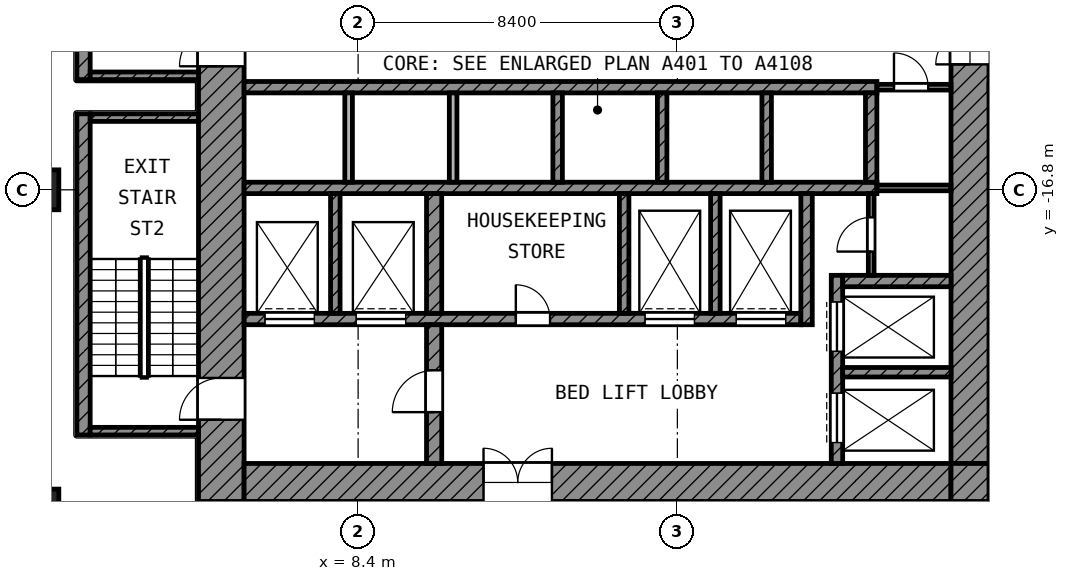
"""IFC4 building model, lengths in metres.
Left out: names, types, materials, properties, quantities, classifications, styles, units other than length and angle.
Written with IfcOpenShell. Run it as: python <this file> out.ifc"""

import sys

from ifc_helpers import new_model, si_unit, direction, frame, frame_2d, origin, origin_2d, place, context, subcontext, project, spatial, rectangle, extrude, element, fill, save


model = new_model("IFC4")
c1 = context("Model", 3, precision=1e-05, world=origin(), true_north=direction((0.0, 1.0)))
c2 = subcontext(c1, "Body", "Model", "MODEL_VIEW")
j1 = project(units=[si_unit("LENGTHUNIT", "METRE"), si_unit("PLANEANGLEUNIT", "RADIAN")], contexts=[c1])
p1 = place(None, origin())
s1 = spatial("IfcSite", under=j1, at=p1, CompositionType="ELEMENT")
p2 = place(p1, origin())
s2 = spatial("IfcBuilding", under=s1, at=p2, CompositionType="ELEMENT")
p3 = place(p2, frame((0.0, 0.0, 98.8)))
s3 = spatial("IfcBuildingStorey", under=s2, at=p3, CompositionType="ELEMENT", Elevation=98.8)
for number, where, z_axis, x_axis in (
    (1, (0.0, -16.8, 0.0), (0.0, 0.0, 1.0), (1.0, 0.0, 0.0)),
    (2, (0.0, -25.2, 0.0), (0.0, 0.0, 1.0), (1.0, 0.0, 0.0)),
):
    element("IfcColumn", number, at=place(p3, frame(where, z_axis=z_axis, x_axis=x_axis)), inside=s3, PredefinedType="COLUMN", context=c2, shape_type="SweptSolid", body=[
        extrude(rectangle(XDim=1.05, YDim=1.05, at=origin_2d()), origin(), (0.0, 0.0, 1.0), 4.2),
    ])
p4 = place(p3, frame((4.8, -25.0, 0.0), z_axis=(0.0, 0.0, 1.0), x_axis=(0.0, 1.0, 0.0)))
e3 = element("IfcWall", 3, at=p4, inside=s3, PredefinedType="SHEAR", context=c2, shape_type="SweptSolid", body=[
    extrude(rectangle(XDim=19.6, YDim=1.2, at=frame_2d((9.8, 0.0))), origin(), (0.0, 0.0, 1.0), 3.6),
])
p5 = place(p4, frame((11.45, 0.0, 0.0)))
e4 = element("IfcOpeningElement", 4, at=p5, cuts=e3, PredefinedType="OPENING", context=c2, shape_type="SweptSolid", body=[
    extrude(rectangle(XDim=1.1, YDim=2.1, at=frame_2d((0.55, 1.05))), frame((0.0, 0.61, 0.0), z_axis=(0.0, -1.0, 0.0), x_axis=(1.0, 0.0, 0.0)), (0.0, 0.0, 1.0), 1.22),
])
p6 = place(p4, frame((2.15, 0.0, 0.0)))
e5 = element("IfcOpeningElement", 5, at=p6, cuts=e3, PredefinedType="OPENING", context=c2, shape_type="SweptSolid", body=[
    extrude(rectangle(XDim=1.1, YDim=2.1, at=frame_2d((0.55, 1.05))), frame((0.0, 0.61, 0.0), z_axis=(0.0, -1.0, 0.0), x_axis=(1.0, 0.0, 0.0)), (0.0, 0.0, 1.0), 1.22),
])
p7 = place(p3, frame((24.5, -24.0, 0.0), z_axis=(0.0, 0.0, 1.0), x_axis=(0.0, 1.0, 0.0)))
e6 = element("IfcWall", 6, at=p7, inside=s3, PredefinedType="SHEAR", context=c2, shape_type="SweptSolid", body=[
    extrude(rectangle(XDim=18.6, YDim=1.0, at=frame_2d((9.3, 0.0))), origin(), (0.0, 0.0, 1.0), 3.6),
])
p8 = place(p7, frame((10.5, 0.0, 0.0)))
e7 = element("IfcOpeningElement", 7, at=p8, cuts=e6, PredefinedType="OPENING", context=c2, shape_type="SweptSolid", body=[
    extrude(rectangle(XDim=1.8, YDim=2.1, at=frame_2d((0.9, 1.05))), frame((0.0, 0.51, 0.0), z_axis=(0.0, -1.0, 0.0), x_axis=(1.0, 0.0, 0.0)), (0.0, 0.0, 1.0), 1.02),
])
p9 = place(p3, frame((5.4, -24.5, 0.0), z_axis=(0.0, 0.0, 1.0), x_axis=(1.0, 0.0, 0.0)))
e8 = element("IfcWall", 8, at=p9, inside=s3, PredefinedType="SHEAR", context=c2, shape_type="SweptSolid", body=[
    extrude(rectangle(XDim=18.6, YDim=1.0, at=frame_2d((9.3, 0.0))), origin(), (0.0, 0.0, 1.0), 3.6),
])
p10 = place(p9, frame((6.3, 0.0, 0.0)))
e9 = element("IfcOpeningElement", 9, at=p10, cuts=e8, PredefinedType="OPENING", context=c2, shape_type="SweptSolid", body=[
    extrude(rectangle(XDim=1.8, YDim=2.1, at=frame_2d((0.9, 1.05))), frame((0.0, 0.51, 0.0), z_axis=(0.0, -1.0, 0.0), x_axis=(1.0, 0.0, 0.0)), (0.0, 0.0, 1.0), 1.02),
])
p11 = place(p3, frame((24.5, -25.0, 0.0), z_axis=(0.0, 0.0, 1.0), x_axis=(0.0, 1.0, 0.0)))
e10 = element("IfcWall", 10, at=p11, inside=s3, PredefinedType="SHEAR", context=c2, shape_type="SweptSolid", body=[
    extrude(rectangle(XDim=1.0, YDim=1.0, at=frame_2d((0.5, 0.0))), origin(), (0.0, 0.0, 1.0), 3.6),
])
for number, where, z_axis, x_axis in (
    (11, (5.4, -14.1, 0.0), (0.0, 0.0, 1.0), (1.0, 0.0, 0.0)),
    (12, (5.4, -16.75, 0.0), (0.0, 0.0, 1.0), (1.0, 0.0, 0.0)),
):
    element("IfcWall", number, at=place(p3, frame(where, z_axis=z_axis, x_axis=x_axis)), inside=s3, PredefinedType="SHEAR", context=c2, shape_type="SweptSolid", body=[
        extrude(rectangle(XDim=16.65, YDim=0.3, at=frame_2d((8.325, 0.0))), origin(), (0.0, 0.0, 1.0), 3.6),
    ])
p12 = place(p3, frame((5.4, -20.2, 0.0), z_axis=(0.0, 0.0, 1.0), x_axis=(1.0, 0.0, 0.0)))
e13 = element("IfcWall", 13, at=p12, inside=s3, PredefinedType="SHEAR", context=c2, shape_type="SweptSolid", body=[
    extrude(rectangle(XDim=14.65, YDim=0.3, at=frame_2d((7.325, 0.0))), origin(), (0.0, 0.0, 1.0), 3.6),
])
p13 = place(p12, frame((10.55, 0.0, 0.0)))
e14 = element("IfcOpeningElement", 14, at=p13, cuts=e13, PredefinedType="OPENING", context=c2, shape_type="SweptSolid", body=[
    extrude(rectangle(XDim=1.3, YDim=2.1, at=frame_2d((0.65, 1.05))), frame((0.0, 0.16, 0.0), z_axis=(0.0, -1.0, 0.0), x_axis=(1.0, 0.0, 0.0)), (0.0, 0.0, 1.0), 0.32),
])
p14 = place(p12, frame((12.95, 0.0, 0.0)))
e15 = element("IfcOpeningElement", 15, at=p14, cuts=e13, PredefinedType="OPENING", context=c2, shape_type="SweptSolid", body=[
    extrude(rectangle(XDim=1.3, YDim=2.1, at=frame_2d((0.65, 1.05))), frame((0.0, 0.16, 0.0), z_axis=(0.0, -1.0, 0.0), x_axis=(1.0, 0.0, 0.0)), (0.0, 0.0, 1.0), 0.32),
])
p15 = place(p12, frame((0.55, 0.0, 0.0)))
e16 = element("IfcOpeningElement", 16, at=p15, cuts=e13, PredefinedType="OPENING", context=c2, shape_type="SweptSolid", body=[
    extrude(rectangle(XDim=1.3, YDim=2.1, at=frame_2d((0.65, 1.05))), frame((0.0, 0.16, 0.0), z_axis=(0.0, -1.0, 0.0), x_axis=(1.0, 0.0, 0.0)), (0.0, 0.0, 1.0), 0.32),
])
p16 = place(p12, frame((2.95, 0.0, 0.0)))
e17 = element("IfcOpeningElement", 17, at=p16, cuts=e13, PredefinedType="OPENING", context=c2, shape_type="SweptSolid", body=[
    extrude(rectangle(XDim=1.3, YDim=2.1, at=frame_2d((0.65, 1.05))), frame((0.0, 0.16, 0.0), z_axis=(0.0, -1.0, 0.0), x_axis=(1.0, 0.0, 0.0)), (0.0, 0.0, 1.0), 0.32),
])
p17 = place(p12, frame((7.15, 0.0, 0.0)))
e18 = element("IfcOpeningElement", 18, at=p17, cuts=e13, PredefinedType="OPENING", context=c2, shape_type="SweptSolid", body=[
    extrude(rectangle(XDim=0.9, YDim=2.1, at=frame_2d((0.45, 1.05))), frame((0.0, 0.16, 0.0), z_axis=(0.0, -1.0, 0.0), x_axis=(1.0, 0.0, 0.0)), (0.0, 0.0, 1.0), 0.32),
])
p18 = place(p3, frame((10.4, -24.0, 0.0), z_axis=(0.0, 0.0, 1.0), x_axis=(0.0, 1.0, 0.0)))
e19 = element("IfcWall", 19, at=p18, inside=s3, PredefinedType="SHEAR", context=c2, shape_type="SweptSolid", body=[
    extrude(rectangle(XDim=3.65, YDim=0.4, at=frame_2d((1.825, 0.0))), origin(), (0.0, 0.0, 1.0), 3.6),
])
p19 = place(p18, frame((1.35, 0.0, 0.0)))
e20 = element("IfcOpeningElement", 20, at=p19, cuts=e19, PredefinedType="OPENING", context=c2, shape_type="SweptSolid", body=[
    extrude(rectangle(XDim=1.1, YDim=2.1, at=frame_2d((0.55, 1.05))), frame((0.0, 0.21, 0.0), z_axis=(0.0, -1.0, 0.0), x_axis=(1.0, 0.0, 0.0)), (0.0, 0.0, 1.0), 0.42),
])
p20 = place(p3, frame((10.4, -20.05, 0.0), z_axis=(0.0, 0.0, 1.0), x_axis=(0.0, 1.0, 0.0)))
e21 = element("IfcWall", 21, at=p20, inside=s3, PredefinedType="SHEAR", context=c2, shape_type="SweptSolid", body=[
    extrude(rectangle(XDim=3.15, YDim=0.4, at=frame_2d((1.575, 0.0))), origin(), (0.0, 0.0, 1.0), 3.6),
])
p21 = place(p3, frame((20.2, -20.35, 0.0), z_axis=(0.0, 0.0, 1.0), x_axis=(0.0, 1.0, 0.0)))
e22 = element("IfcWall", 22, at=p21, inside=s3, PredefinedType="SHEAR", context=c2, shape_type="SweptSolid", body=[
    extrude(rectangle(XDim=3.45, YDim=0.3, at=frame_2d((1.725, 0.0))), origin(), (0.0, 0.0, 1.0), 3.6),
])
p22 = place(p3, frame((21.9, -16.6, 0.0), z_axis=(0.0, 0.0, 1.0), x_axis=(0.0, 1.0, 0.0)))
e23 = element("IfcWall", 23, at=p22, inside=s3, PredefinedType="SHEAR", context=c2, shape_type="SweptSolid", body=[
    extrude(rectangle(XDim=2.35, YDim=0.3, at=frame_2d((1.175, 0.0))), origin(), (0.0, 0.0, 1.0), 3.6),
])
p23 = place(p3, frame((21.15, -19.2, 0.0), z_axis=(0.0, 0.0, 1.0), x_axis=(1.0, 0.0, 0.0)))
e24 = element("IfcWall", 24, at=p23, inside=s3, PredefinedType="SHEAR", context=c2, shape_type="SweptSolid", body=[
    extrude(rectangle(XDim=2.85, YDim=0.3, at=frame_2d((1.425, 0.0))), origin(), (0.0, 0.0, 1.0), 3.6),
])
p24 = place(p3, frame((21.0, -24.0, 0.0), z_axis=(0.0, 0.0, 1.0), x_axis=(0.0, 1.0, 0.0)))
e25 = element("IfcWall", 25, at=p24, inside=s3, PredefinedType="SHEAR", context=c2, shape_type="SweptSolid", body=[
    extrude(rectangle(XDim=4.95, YDim=0.3, at=frame_2d((2.475, 0.0))), origin(), (0.0, 0.0, 1.0), 3.6),
])
p25 = place(p24, frame((2.95, 0.0, 0.0)))
e26 = element("IfcOpeningElement", 26, at=p25, cuts=e25, PredefinedType="OPENING", context=c2, shape_type="SweptSolid", body=[
    extrude(rectangle(XDim=1.3, YDim=2.1, at=frame_2d((0.65, 1.05))), frame((0.0, 0.16, 0.0), z_axis=(0.0, -1.0, 0.0), x_axis=(1.0, 0.0, 0.0)), (0.0, 0.0, 1.0), 0.32),
])
p26 = place(p24, frame((0.55, 0.0, 0.0)))
e27 = element("IfcOpeningElement", 27, at=p26, cuts=e25, PredefinedType="OPENING", context=c2, shape_type="SweptSolid", body=[
    extrude(rectangle(XDim=1.3, YDim=2.1, at=frame_2d((0.65, 1.05))), frame((0.0, 0.16, 0.0), z_axis=(0.0, -1.0, 0.0), x_axis=(1.0, 0.0, 0.0)), (0.0, 0.0, 1.0), 0.32),
])
p27 = place(p3, frame((21.15, -21.6, 0.0), z_axis=(0.0, 0.0, 1.0), x_axis=(1.0, 0.0, 0.0)))
e28 = element("IfcWall", 28, at=p27, inside=s3, PredefinedType="SHEAR", context=c2, shape_type="SweptSolid", body=[
    extrude(rectangle(XDim=2.85, YDim=0.25, at=frame_2d((1.425, 0.0))), origin(), (0.0, 0.0, 1.0), 3.6),
])
for number, where, z_axis, x_axis in (
    (29, (7.8, -20.05, 0.0), (0.0, 0.0, 1.0), (0.0, 1.0, 0.0)),
    (30, (15.4, -20.05, 0.0), (0.0, 0.0, 1.0), (0.0, 1.0, 0.0)),
    (31, (17.8, -20.05, 0.0), (0.0, 0.0, 1.0), (0.0, 1.0, 0.0)),
):
    element("IfcWall", number, at=place(p3, frame(where, z_axis=z_axis, x_axis=x_axis)), inside=s3, PredefinedType="SHEAR", context=c2, shape_type="SweptSolid", body=[
        extrude(rectangle(XDim=3.15, YDim=0.25, at=frame_2d((1.575, 0.0))), origin(), (0.0, 0.0, 1.0), 3.6),
    ])
for number, where, z_axis, x_axis in (
    (32, (8.15, -16.6, 0.0), (0.0, 0.0, 1.0), (0.0, 1.0, 0.0)),
    (33, (10.9, -16.6, 0.0), (0.0, 0.0, 1.0), (0.0, 1.0, 0.0)),
):
    element("IfcWall", number, at=place(p3, frame(where, z_axis=z_axis, x_axis=x_axis)), inside=s3, PredefinedType="PARTITIONING", context=c2, shape_type="SweptSolid", body=[
        extrude(rectangle(XDim=2.35, YDim=0.2, at=frame_2d((1.175, 0.0))), origin(), (0.0, 0.0, 1.0), 3.6),
    ])
for number, where, z_axis, x_axis in (
    (34, (13.65, -16.6, 0.0), (0.0, 0.0, 1.0), (0.0, 1.0, 0.0)),
    (35, (16.4, -16.6, 0.0), (0.0, 0.0, 1.0), (0.0, 1.0, 0.0)),
    (36, (19.15, -16.6, 0.0), (0.0, 0.0, 1.0), (0.0, 1.0, 0.0)),
):
    element("IfcWall", number, at=place(p3, frame(where, z_axis=z_axis, x_axis=x_axis)), inside=s3, PredefinedType="SHEAR", context=c2, shape_type="SweptSolid", body=[
        extrude(rectangle(XDim=2.35, YDim=0.25, at=frame_2d((1.175, 0.0))), origin(), (0.0, 0.0, 1.0), 3.6),
    ])
p28 = place(p3, frame((21.9, -19.05, 0.0), z_axis=(0.0, 0.0, 1.0), x_axis=(0.0, 1.0, 0.0)))
e37 = element("IfcWall", 37, at=p28, inside=s3, PredefinedType="PARTITIONING", context=c2, shape_type="SweptSolid", body=[
    extrude(rectangle(XDim=2.15, YDim=0.15, at=frame_2d((1.075, 0.0))), origin(), (0.0, 0.0, 1.0), 3.6),
])
p29 = place(p28, frame((0.625, 0.0, 0.0)))
e38 = element("IfcOpeningElement", 38, at=p29, cuts=e37, PredefinedType="OPENING", context=c2, shape_type="SweptSolid", body=[
    extrude(rectangle(XDim=0.9, YDim=2.1, at=frame_2d((0.45, 1.05))), frame((0.0, 0.085, 0.0), z_axis=(0.0, -1.0, 0.0), x_axis=(1.0, 0.0, 0.0)), (0.0, 0.0, 1.0), 0.17),
])
p30 = place(p3, frame((22.05, -16.75, 0.0), z_axis=(0.0, 0.0, 1.0), x_axis=(1.0, 0.0, 0.0)))
e39 = element("IfcWall", 39, at=p30, inside=s3, PredefinedType="PARTITIONING", context=c2, shape_type="SweptSolid", body=[
    extrude(rectangle(XDim=1.95, YDim=0.15, at=frame_2d((0.975, 0.0))), origin(), (0.0, 0.0, 1.0), 3.6),
])
p31 = place(p3, frame((22.05, -14.1, 0.0), z_axis=(0.0, 0.0, 1.0), x_axis=(1.0, 0.0, 0.0)))
e40 = element("IfcWall", 40, at=p31, inside=s3, PredefinedType="PARTITIONING", context=c2, shape_type="SweptSolid", body=[
    extrude(rectangle(XDim=1.95, YDim=0.15, at=frame_2d((0.975, 0.0))), origin(), (0.0, 0.0, 1.0), 3.6),
])
p32 = place(p31, frame((0.45, 0.0, 0.0)))
e41 = element("IfcOpeningElement", 41, at=p32, cuts=e40, PredefinedType="OPENING", context=c2, shape_type="SweptSolid", body=[
    extrude(rectangle(XDim=0.9, YDim=2.1, at=frame_2d((0.45, 1.05))), frame((0.0, 0.085, 0.0), z_axis=(0.0, -1.0, 0.0), x_axis=(1.0, 0.0, 0.0)), (0.0, 0.0, 1.0), 0.17),
])
p33 = place(p3, frame((1.175, -13.9, 0.0), z_axis=(0.0, 0.0, 1.0), x_axis=(0.0, 1.0, 0.0)))
e42 = element("IfcWall", 42, at=p33, inside=s3, PredefinedType="SHEAR", context=c2, shape_type="SweptSolid", body=[
    extrude(rectangle(XDim=8.45, YDim=0.35, at=frame_2d((4.225, 0.0))), origin(), (0.0, 0.0, 1.0), 3.6),
])
p34 = place(p3, frame((1.35, -13.8, 0.0), z_axis=(0.0, 0.0, 1.0), x_axis=(1.0, 0.0, 0.0)))
e43 = element("IfcWall", 43, at=p34, inside=s3, PredefinedType="SHEAR", context=c2, shape_type="SweptSolid", body=[
    extrude(rectangle(XDim=2.85, YDim=0.2, at=frame_2d((1.425, 0.0))), origin(), (0.0, 0.0, 1.0), 3.6),
])
p35 = place(p3, frame((1.175, -23.25, 0.0), z_axis=(0.0, 0.0, 1.0), x_axis=(0.0, 1.0, 0.0)))
e44 = element("IfcWall", 44, at=p35, inside=s3, PredefinedType="SHEAR", context=c2, shape_type="SweptSolid", body=[
    extrude(rectangle(XDim=8.45, YDim=0.35, at=frame_2d((4.225, 0.0))), origin(), (0.0, 0.0, 1.0), 3.6),
])
for number, where, z_axis, x_axis in (
    (45, (1.35, -14.9, 0.0), (0.0, 0.0, 1.0), (1.0, 0.0, 0.0)),
    (46, (1.35, -23.15, 0.0), (0.0, 0.0, 1.0), (1.0, 0.0, 0.0)),
):
    element("IfcWall", number, at=place(p3, frame(where, z_axis=z_axis, x_axis=x_axis)), inside=s3, PredefinedType="SHEAR", context=c2, shape_type="SweptSolid", body=[
        extrude(rectangle(XDim=2.85, YDim=0.2, at=frame_2d((1.425, 0.0))), origin(), (0.0, 0.0, 1.0), 3.6),
    ])
p36 = place(p3, frame((8.4, -31.782, 0.0), z_axis=(0.0, 0.0, 1.0), x_axis=(0.0, 1.0, 0.0)))
e47 = element("IfcWall", 47, at=p36, inside=s3, PredefinedType="PARTITIONING", context=c2, shape_type="SweptSolid", body=[
    extrude(rectangle(XDim=6.782, YDim=0.15, at=frame_2d((3.391, 0.0))), origin(), (0.0, 0.0, 1.0), 3.6),
])
p37 = place(p36, frame((3.732, 0.0, 0.0)))
e48 = element("IfcOpeningElement", 48, at=p37, cuts=e47, PredefinedType="OPENING", context=c2, shape_type="SweptSolid", body=[
    extrude(rectangle(XDim=1.2, YDim=2.1, at=frame_2d((0.6, 1.05))), frame((0.0, 0.085, 0.0), z_axis=(0.0, -1.0, 0.0), x_axis=(1.0, 0.0, 0.0)), (0.0, 0.0, 1.0), 0.17),
])
p38 = place(p3, frame((14.1, -29.325, 0.0), z_axis=(0.0, 0.0, 1.0), x_axis=(0.0, 1.0, 0.0)))
e49 = element("IfcWall", 49, at=p38, inside=s3, PredefinedType="PARTITIONING", context=c2, shape_type="SweptSolid", body=[
    extrude(rectangle(XDim=4.325, YDim=0.15, at=frame_2d((2.163, 0.0))), origin(), (0.0, 0.0, 1.0), 3.6),
])
p39 = place(p25, origin())
e50 = element("IfcDoor", 50, at=p39, inside=s3, OperationType="DOUBLE_DOOR_SLIDING", PredefinedType="DOOR", context=c2, shape_type="SweptSolid", body=[
    extrude(rectangle(XDim=1.3, YDim=2.1, at=frame_2d((0.65, 1.05))), frame((0.0, 0.025, 0.0), z_axis=(0.0, -1.0, 0.0), x_axis=(1.0, 0.0, 0.0)), (0.0, 0.0, 1.0), 0.05),
])
fill(e26, e50)
p40 = place(p26, origin())
e51 = element("IfcDoor", 51, at=p40, inside=s3, OperationType="DOUBLE_DOOR_SLIDING", PredefinedType="DOOR", context=c2, shape_type="SweptSolid", body=[
    extrude(rectangle(XDim=1.3, YDim=2.1, at=frame_2d((0.65, 1.05))), frame((0.0, 0.025, 0.0), z_axis=(0.0, -1.0, 0.0), x_axis=(1.0, 0.0, 0.0)), (0.0, 0.0, 1.0), 0.05),
])
fill(e27, e51)
p41 = place(p13, origin())
e52 = element("IfcDoor", 52, at=p41, inside=s3, OperationType="DOUBLE_DOOR_SLIDING", PredefinedType="DOOR", context=c2, shape_type="SweptSolid", body=[
    extrude(rectangle(XDim=1.3, YDim=2.1, at=frame_2d((0.65, 1.05))), frame((0.0, 0.025, 0.0), z_axis=(0.0, -1.0, 0.0), x_axis=(1.0, 0.0, 0.0)), (0.0, 0.0, 1.0), 0.05),
])
fill(e14, e52)
p42 = place(p14, origin())
e53 = element("IfcDoor", 53, at=p42, inside=s3, OperationType="DOUBLE_DOOR_SLIDING", PredefinedType="DOOR", context=c2, shape_type="SweptSolid", body=[
    extrude(rectangle(XDim=1.3, YDim=2.1, at=frame_2d((0.65, 1.05))), frame((0.0, 0.025, 0.0), z_axis=(0.0, -1.0, 0.0), x_axis=(1.0, 0.0, 0.0)), (0.0, 0.0, 1.0), 0.05),
])
fill(e15, e53)
p43 = place(p15, origin())
e54 = element("IfcDoor", 54, at=p43, inside=s3, OperationType="DOUBLE_DOOR_SLIDING", PredefinedType="DOOR", context=c2, shape_type="SweptSolid", body=[
    extrude(rectangle(XDim=1.3, YDim=2.1, at=frame_2d((0.65, 1.05))), frame((0.0, 0.025, 0.0), z_axis=(0.0, -1.0, 0.0), x_axis=(1.0, 0.0, 0.0)), (0.0, 0.0, 1.0), 0.05),
])
fill(e16, e54)
p44 = place(p16, origin())
e55 = element("IfcDoor", 55, at=p44, inside=s3, OperationType="DOUBLE_DOOR_SLIDING", PredefinedType="DOOR", context=c2, shape_type="SweptSolid", body=[
    extrude(rectangle(XDim=1.3, YDim=2.1, at=frame_2d((0.65, 1.05))), frame((0.0, 0.025, 0.0), z_axis=(0.0, -1.0, 0.0), x_axis=(1.0, 0.0, 0.0)), (0.0, 0.0, 1.0), 0.05),
])
fill(e17, e55)
p45 = place(p5, origin())
e56 = element("IfcDoor", 56, at=p45, inside=s3, OperationType="SINGLE_SWING_LEFT", PredefinedType="DOOR", context=c2, shape_type="SweptSolid", body=[
    extrude(rectangle(XDim=1.1, YDim=2.1, at=frame_2d((0.55, 1.05))), frame((0.0, 0.025, 0.0), z_axis=(0.0, -1.0, 0.0), x_axis=(1.0, 0.0, 0.0)), (0.0, 0.0, 1.0), 0.05),
])
fill(e4, e56)
p46 = place(p6, origin())
e57 = element("IfcDoor", 57, at=p46, inside=s3, OperationType="SINGLE_SWING_LEFT", PredefinedType="DOOR", context=c2, shape_type="SweptSolid", body=[
    extrude(rectangle(XDim=1.1, YDim=2.1, at=frame_2d((0.55, 1.05))), frame((0.0, 0.025, 0.0), z_axis=(0.0, -1.0, 0.0), x_axis=(1.0, 0.0, 0.0)), (0.0, 0.0, 1.0), 0.05),
])
fill(e5, e57)
p47 = place(p19, origin())
e58 = element("IfcDoor", 58, at=p47, inside=s3, OperationType="SINGLE_SWING_LEFT", PredefinedType="DOOR", context=c2, shape_type="SweptSolid", body=[
    extrude(rectangle(XDim=1.1, YDim=2.1, at=frame_2d((0.55, 1.05))), frame((0.0, 0.025, 0.0), z_axis=(0.0, -1.0, 0.0), x_axis=(1.0, 0.0, 0.0)), (0.0, 0.0, 1.0), 0.05),
])
fill(e20, e58)
p48 = place(p8, origin())
e59 = element("IfcDoor", 59, at=p48, inside=s3, OperationType="DOUBLE_DOOR_SINGLE_SWING", PredefinedType="DOOR", context=c2, shape_type="SweptSolid", body=[
    extrude(rectangle(XDim=1.8, YDim=2.1, at=frame_2d((0.9, 1.05))), frame((0.0, 0.025, 0.0), z_axis=(0.0, -1.0, 0.0), x_axis=(1.0, 0.0, 0.0)), (0.0, 0.0, 1.0), 0.05),
])
fill(e7, e59)
p49 = place(p10, origin())
e60 = element("IfcDoor", 60, at=p49, inside=s3, OperationType="DOUBLE_DOOR_SINGLE_SWING", PredefinedType="DOOR", context=c2, shape_type="SweptSolid", body=[
    extrude(rectangle(XDim=1.8, YDim=2.1, at=frame_2d((0.9, 1.05))), frame((0.0, 0.025, 0.0), z_axis=(0.0, -1.0, 0.0), x_axis=(1.0, 0.0, 0.0)), (0.0, 0.0, 1.0), 0.05),
])
fill(e9, e60)
p50 = place(p32, origin())
e61 = element("IfcDoor", 61, at=p50, inside=s3, OperationType="SINGLE_SWING_LEFT", PredefinedType="DOOR", context=c2, shape_type="SweptSolid", body=[
    extrude(rectangle(XDim=0.9, YDim=2.1, at=frame_2d((0.45, 1.05))), frame((0.0, 0.025, 0.0), z_axis=(0.0, -1.0, 0.0), x_axis=(1.0, 0.0, 0.0)), (0.0, 0.0, 1.0), 0.05),
])
fill(e41, e61)
p51 = place(p29, origin())
e62 = element("IfcDoor", 62, at=p51, inside=s3, OperationType="SINGLE_SWING_LEFT", PredefinedType="DOOR", context=c2, shape_type="SweptSolid", body=[
    extrude(rectangle(XDim=0.9, YDim=2.1, at=frame_2d((0.45, 1.05))), frame((0.0, 0.025, 0.0), z_axis=(0.0, -1.0, 0.0), x_axis=(1.0, 0.0, 0.0)), (0.0, 0.0, 1.0), 0.05),
])
fill(e38, e62)
p52 = place(p17, origin())
e63 = element("IfcDoor", 63, at=p52, inside=s3, OperationType="SINGLE_SWING_LEFT", PredefinedType="DOOR", context=c2, shape_type="SweptSolid", body=[
    extrude(rectangle(XDim=0.9, YDim=2.1, at=frame_2d((0.45, 1.05))), frame((0.0, 0.025, 0.0), z_axis=(0.0, -1.0, 0.0), x_axis=(1.0, 0.0, 0.0)), (0.0, 0.0, 1.0), 0.05),
])
fill(e18, e63)
save(model, sys.argv[1])
